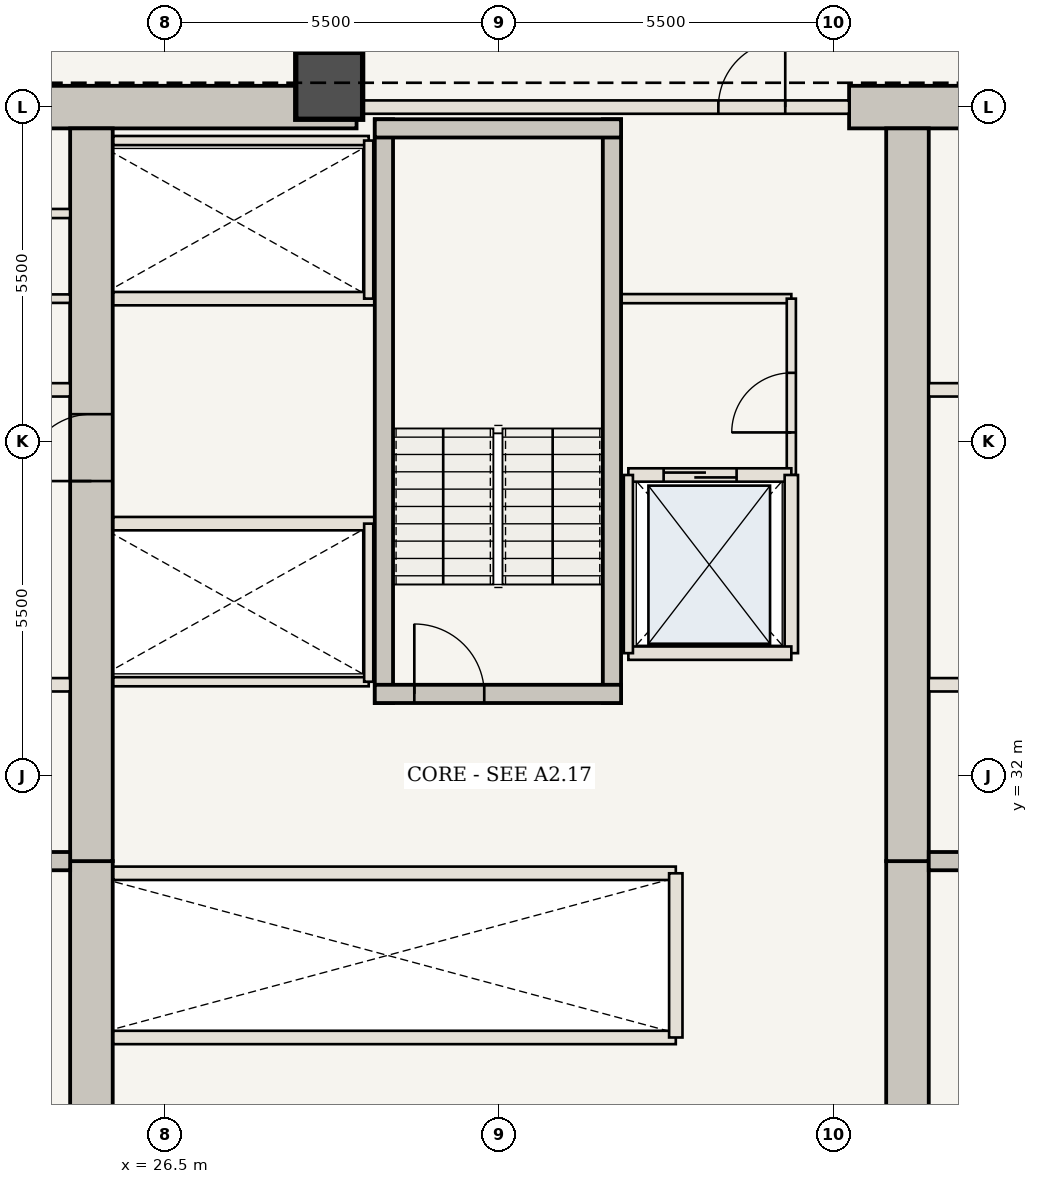
"""IFC4 building model, lengths in metres.
Left out: names, types, materials, properties, quantities, classifications, styles, units other than length and angle.
Written with IfcOpenShell. Run it as: python <this file> out.ifc"""

import sys

from ifc_helpers import new_model, si_unit, direction, frame, frame_2d, origin, origin_2d, place, context, subcontext, project, spatial, rectangle, extrude, element, fill, save


model = new_model("IFC4")
c1 = context("Model", 3, precision=1e-05, world=origin(), true_north=direction((0.0, 1.0)))
c2 = subcontext(c1, "Body", "Model", "MODEL_VIEW")
j1 = project(units=[si_unit("LENGTHUNIT", "METRE"), si_unit("PLANEANGLEUNIT", "RADIAN")], contexts=[c1])
p1 = place(None, origin())
s1 = spatial("IfcSite", under=j1, at=p1, CompositionType="ELEMENT")
p2 = place(p1, origin())
s2 = spatial("IfcBuilding", under=s1, at=p2, CompositionType="ELEMENT")
p3 = place(p2, frame((0.0, 0.0, 66.85)))
s3 = spatial("IfcBuildingStorey", under=s2, at=p3, CompositionType="ELEMENT", Elevation=66.85)
p4 = place(p3, frame((21.41, 43.0, 0.0), z_axis=(0.0, 0.0, 1.0), x_axis=(1.0, 0.0, 0.0)))
e1 = element("IfcWall", 1, at=p4, inside=s3, PredefinedType="SHEAR", context=c2, shape_type="SweptSolid", body=[
    extrude(rectangle(XDim=8.24, YDim=0.7, at=frame_2d((4.12, 0.0))), origin(), (0.0, 0.0, 1.0), 3.5),
])
p5 = place(p3, frame((37.75, 43.0, 0.0), z_axis=(0.0, 0.0, 1.0), x_axis=(1.0, 0.0, 0.0)))
e2 = element("IfcWall", 2, at=p5, inside=s3, PredefinedType="SHEAR", context=c2, shape_type="SweptSolid", body=[
    extrude(rectangle(XDim=4.84, YDim=0.7, at=frame_2d((2.42, 0.0))), origin(), (0.0, 0.0, 1.0), 3.5),
])
p6 = place(p3, frame((25.29, 21.3, 0.0), z_axis=(0.0, 0.0, 1.0), x_axis=(0.0, 1.0, 0.0)))
e3 = element("IfcWall", 3, at=p6, inside=s3, PredefinedType="SHEAR", context=c2, shape_type="SweptSolid", body=[
    extrude(rectangle(XDim=9.3, YDim=0.7, at=frame_2d((4.65, 0.0))), origin(), (0.0, 0.0, 1.0), 3.5),
])
p7 = place(p3, frame((25.29, 30.6, 0.0), z_axis=(0.0, 0.0, 1.0), x_axis=(0.0, 1.0, 0.0)))
e4 = element("IfcWall", 4, at=p7, inside=s3, PredefinedType="SHEAR", context=c2, shape_type="SweptSolid", body=[
    extrude(rectangle(XDim=12.05, YDim=0.7, at=frame_2d((6.025, 0.0))), origin(), (0.0, 0.0, 1.0), 3.5),
])
p8 = place(p7, frame((6.25, 0.0, 0.0)))
e5 = element("IfcOpeningElement", 5, at=p8, cuts=e4, PredefinedType="OPENING", context=c2, shape_type="SweptSolid", body=[
    extrude(rectangle(XDim=1.1, YDim=2.15, at=frame_2d((0.55, 1.075))), frame((0.0, 0.36, 0.0), z_axis=(0.0, -1.0, 0.0), x_axis=(1.0, 0.0, 0.0)), (0.0, 0.0, 1.0), 0.72),
])
p9 = place(p3, frame((38.71, 21.3, 0.0), z_axis=(0.0, 0.0, 1.0), x_axis=(0.0, 1.0, 0.0)))
e6 = element("IfcWall", 6, at=p9, inside=s3, PredefinedType="SHEAR", context=c2, shape_type="SweptSolid", body=[
    extrude(rectangle(XDim=9.3, YDim=0.7, at=frame_2d((4.65, 0.0))), origin(), (0.0, 0.0, 1.0), 3.5),
])
p10 = place(p3, frame((38.71, 30.6, 0.0), z_axis=(0.0, 0.0, 1.0), x_axis=(0.0, 1.0, 0.0)))
e7 = element("IfcWall", 7, at=p10, inside=s3, PredefinedType="SHEAR", context=c2, shape_type="SweptSolid", body=[
    extrude(rectangle(XDim=12.05, YDim=0.7, at=frame_2d((6.025, 0.0))), origin(), (0.0, 0.0, 1.0), 3.5),
])
p11 = place(p3, frame((29.2, 43.35, 0.0), z_axis=(0.0, 0.0, 1.0), x_axis=(1.0, 0.0, 0.0)))
e8 = element("IfcColumn", 8, at=p11, inside=s3, PredefinedType="COLUMN", context=c2, shape_type="SweptSolid", body=[
    extrude(rectangle(XDim=1.1, YDim=1.1, at=origin_2d()), origin(), (0.0, 0.0, 1.0), 3.5),
])
for number, where, z_axis, x_axis in (
    (9, (21.41, 30.6, 0.0), (0.0, 0.0, 1.0), (1.0, 0.0, 0.0)),
    (10, (39.06, 30.6, 0.0), (0.0, 0.0, 1.0), (1.0, 0.0, 0.0)),
):
    element("IfcWall", number, at=place(p3, frame(where, z_axis=z_axis, x_axis=x_axis)), inside=s3, PredefinedType="SHEAR", context=c2, shape_type="SweptSolid", body=[
        extrude(rectangle(XDim=3.53, YDim=0.3, at=frame_2d((1.765, 0.0))), origin(), (0.0, 0.0, 1.0), 3.32),
    ])
p12 = place(p3, frame((21.41, 33.5, 0.0), z_axis=(0.0, 0.0, 1.0), x_axis=(1.0, 0.0, 0.0)))
e11 = element("IfcWall", 11, at=p12, inside=s3, PredefinedType="STANDARD", context=c2, shape_type="SweptSolid", body=[
    extrude(rectangle(XDim=3.53, YDim=0.22, at=frame_2d((1.765, 0.0))), origin(), (0.0, 0.0, 1.0), 3.32),
])
p13 = place(p12, frame((0.75, 0.0, 0.0)))
e12 = element("IfcOpeningElement", 12, at=p13, cuts=e11, PredefinedType="OPENING", context=c2, shape_type="SweptSolid", body=[
    extrude(rectangle(XDim=1.2, YDim=2.2, at=frame_2d((0.6, 1.1))), frame((0.0, 0.12, 0.0), z_axis=(0.0, -1.0, 0.0), x_axis=(1.0, 0.0, 0.0)), (0.0, 0.0, 1.0), 0.24),
])
p14 = place(p3, frame((39.06, 33.5, 0.0), z_axis=(0.0, 0.0, 1.0), x_axis=(1.0, 0.0, 0.0)))
e13 = element("IfcWall", 13, at=p14, inside=s3, PredefinedType="STANDARD", context=c2, shape_type="SweptSolid", body=[
    extrude(rectangle(XDim=3.53, YDim=0.22, at=frame_2d((1.765, 0.0))), origin(), (0.0, 0.0, 1.0), 3.32),
])
p15 = place(p14, frame((1.55, 0.0, 0.0)))
e14 = element("IfcOpeningElement", 14, at=p15, cuts=e13, PredefinedType="OPENING", context=c2, shape_type="SweptSolid", body=[
    extrude(rectangle(XDim=1.2, YDim=2.2, at=frame_2d((0.6, 1.1))), frame((0.0, 0.12, 0.0), z_axis=(0.0, -1.0, 0.0), x_axis=(1.0, 0.0, 0.0)), (0.0, 0.0, 1.0), 0.24),
])
for number, where, z_axis, x_axis in (
    (15, (21.41, 38.35, 0.0), (0.0, 0.0, 1.0), (1.0, 0.0, 0.0)),
    (16, (39.06, 38.35, 0.0), (0.0, 0.0, 1.0), (1.0, 0.0, 0.0)),
):
    element("IfcWall", number, at=place(p3, frame(where, z_axis=z_axis, x_axis=x_axis)), inside=s3, PredefinedType="STANDARD", context=c2, shape_type="SweptSolid", body=[
        extrude(rectangle(XDim=3.53, YDim=0.22, at=frame_2d((1.765, 0.0))), origin(), (0.0, 0.0, 1.0), 3.32),
    ])
p16 = place(p3, frame((21.41, 39.85, 0.0), z_axis=(0.0, 0.0, 1.0), x_axis=(1.0, 0.0, 0.0)))
e17 = element("IfcWall", 17, at=p16, inside=s3, PredefinedType="STANDARD", context=c2, shape_type="SweptSolid", body=[
    extrude(rectangle(XDim=3.53, YDim=0.14, at=frame_2d((1.765, 0.0))), origin(), (0.0, 0.0, 1.0), 3.32),
])
p17 = place(p3, frame((21.41, 41.25, 0.0), z_axis=(0.0, 0.0, 1.0), x_axis=(1.0, 0.0, 0.0)))
e18 = element("IfcWall", 18, at=p17, inside=s3, PredefinedType="STANDARD", context=c2, shape_type="SweptSolid", body=[
    extrude(rectangle(XDim=3.53, YDim=0.15, at=frame_2d((1.765, 0.0))), origin(), (0.0, 0.0, 1.0), 3.32),
])
p18 = place(p3, frame((34.0, 39.85, 0.0), z_axis=(0.0, 0.0, 1.0), x_axis=(1.0, 0.0, 0.0)))
e19 = element("IfcWall", 19, at=p18, inside=s3, PredefinedType="STANDARD", context=c2, shape_type="SweptSolid", body=[
    extrude(rectangle(XDim=2.8, YDim=0.15, at=frame_2d((1.4, 0.0))), origin(), (0.0, 0.0, 1.0), 3.32),
])
p19 = place(p3, frame((36.8, 36.95, 0.0), z_axis=(0.0, 0.0, 1.0), x_axis=(0.0, 1.0, 0.0)))
e20 = element("IfcWall", 20, at=p19, inside=s3, PredefinedType="STANDARD", context=c2, shape_type="SweptSolid", body=[
    extrude(rectangle(XDim=2.9, YDim=0.15, at=frame_2d((1.45, 0.0))), origin(), (0.0, 0.0, 1.0), 3.32),
])
p20 = place(p19, frame((0.7, 0.0, 0.0)))
e21 = element("IfcOpeningElement", 21, at=p20, cuts=e20, PredefinedType="OPENING", context=c2, shape_type="SweptSolid", body=[
    extrude(rectangle(XDim=0.98, YDim=2.2, at=frame_2d((0.49, 1.1))), frame((0.0, 0.085, 0.0), z_axis=(0.0, -1.0, 0.0), x_axis=(1.0, 0.0, 0.0)), (0.0, 0.0, 1.0), 0.17),
])
for number, where, z_axis, x_axis in (
    (22, (25.65, 27.7, 0.0), (0.0, 0.0, 1.0), (1.0, 0.0, 0.0)),
    (23, (25.65, 30.4, 0.0), (0.0, 0.0, 1.0), (1.0, 0.0, 0.0)),
):
    element("IfcWall", number, at=place(p3, frame(where, z_axis=z_axis, x_axis=x_axis)), inside=s3, PredefinedType="STANDARD", context=c2, shape_type="SweptSolid", body=[
        extrude(rectangle(XDim=9.25, YDim=0.22, at=frame_2d((4.625, 0.0))), origin(), (0.0, 0.0, 1.0), 3.32),
    ])
p21 = place(p3, frame((34.9, 27.7, 0.0), z_axis=(0.0, 0.0, 1.0), x_axis=(0.0, 1.0, 0.0)))
e24 = element("IfcWall", 24, at=p21, inside=s3, PredefinedType="STANDARD", context=c2, shape_type="SweptSolid", body=[
    extrude(rectangle(XDim=2.7, YDim=0.22, at=frame_2d((1.35, 0.0))), origin(), (0.0, 0.0, 1.0), 3.32),
])
p22 = place(p3, frame((25.65, 36.15, 0.0), z_axis=(0.0, 0.0, 1.0), x_axis=(1.0, 0.0, 0.0)))
e25 = element("IfcWall", 25, at=p22, inside=s3, PredefinedType="STANDARD", context=c2, shape_type="SweptSolid", body=[
    extrude(rectangle(XDim=4.3, YDim=0.22, at=frame_2d((2.15, 0.0))), origin(), (0.0, 0.0, 1.0), 3.32),
])
p23 = place(p3, frame((25.65, 33.55, 0.0), z_axis=(0.0, 0.0, 1.0), x_axis=(1.0, 0.0, 0.0)))
e26 = element("IfcWall", 26, at=p23, inside=s3, PredefinedType="STANDARD", context=c2, shape_type="SweptSolid", body=[
    extrude(rectangle(XDim=4.2, YDim=0.15, at=frame_2d((2.1, 0.0))), origin(), (0.0, 0.0, 1.0), 3.32),
])
p24 = place(p3, frame((29.85, 33.55, 0.0), z_axis=(0.0, 0.0, 1.0), x_axis=(0.0, 1.0, 0.0)))
e27 = element("IfcWall", 27, at=p24, inside=s3, PredefinedType="STANDARD", context=c2, shape_type="SweptSolid", body=[
    extrude(rectangle(XDim=2.6, YDim=0.15, at=frame_2d((1.3, 0.0))), origin(), (0.0, 0.0, 1.0), 3.32),
])
p25 = place(p3, frame((25.65, 39.85, 0.0), z_axis=(0.0, 0.0, 1.0), x_axis=(1.0, 0.0, 0.0)))
e28 = element("IfcWall", 28, at=p25, inside=s3, PredefinedType="STANDARD", context=c2, shape_type="SweptSolid", body=[
    extrude(rectangle(XDim=4.3, YDim=0.22, at=frame_2d((2.15, 0.0))), origin(), (0.0, 0.0, 1.0), 3.32),
])
p26 = place(p3, frame((25.65, 42.45, 0.0), z_axis=(0.0, 0.0, 1.0), x_axis=(1.0, 0.0, 0.0)))
e29 = element("IfcWall", 29, at=p26, inside=s3, PredefinedType="STANDARD", context=c2, shape_type="SweptSolid", body=[
    extrude(rectangle(XDim=4.2, YDim=0.15, at=frame_2d((2.1, 0.0))), origin(), (0.0, 0.0, 1.0), 3.32),
])
p27 = place(p3, frame((29.85, 39.85, 0.0), z_axis=(0.0, 0.0, 1.0), x_axis=(0.0, 1.0, 0.0)))
e30 = element("IfcWall", 30, at=p27, inside=s3, PredefinedType="STANDARD", context=c2, shape_type="SweptSolid", body=[
    extrude(rectangle(XDim=2.6, YDim=0.15, at=frame_2d((1.3, 0.0))), origin(), (0.0, 0.0, 1.0), 3.32),
])
for number, where, z_axis, x_axis in (
    (31, (30.1, 33.2, 0.0), (0.0, 0.0, 1.0), (0.0, 1.0, 0.0)),
    (32, (33.85, 33.2, 0.0), (0.0, 0.0, 1.0), (0.0, 1.0, 0.0)),
):
    element("IfcWall", number, at=place(p3, frame(where, z_axis=z_axis, x_axis=x_axis)), inside=s3, PredefinedType="SHEAR", context=c2, shape_type="SweptSolid", body=[
        extrude(rectangle(XDim=9.6, YDim=0.3, at=frame_2d((4.8, 0.0))), origin(), (0.0, 0.0, 1.0), 3.32),
    ])
p28 = place(p3, frame((29.95, 33.35, 0.0), z_axis=(0.0, 0.0, 1.0), x_axis=(1.0, 0.0, 0.0)))
e33 = element("IfcWall", 33, at=p28, inside=s3, PredefinedType="SHEAR", context=c2, shape_type="SweptSolid", body=[
    extrude(rectangle(XDim=4.05, YDim=0.3, at=frame_2d((2.025, 0.0))), origin(), (0.0, 0.0, 1.0), 3.32),
])
p29 = place(p28, frame((0.65, 0.0, 0.0)))
e34 = element("IfcOpeningElement", 34, at=p29, cuts=e33, PredefinedType="OPENING", context=c2, shape_type="SweptSolid", body=[
    extrude(rectangle(XDim=1.15, YDim=2.15, at=frame_2d((0.575, 1.075))), frame((0.0, 0.16, 0.0), z_axis=(0.0, -1.0, 0.0), x_axis=(1.0, 0.0, 0.0)), (0.0, 0.0, 1.0), 0.32),
])
p30 = place(p3, frame((29.95, 42.65, 0.0), z_axis=(0.0, 0.0, 1.0), x_axis=(1.0, 0.0, 0.0)))
e35 = element("IfcWall", 35, at=p30, inside=s3, PredefinedType="SHEAR", context=c2, shape_type="SweptSolid", body=[
    extrude(rectangle(XDim=4.05, YDim=0.3, at=frame_2d((2.025, 0.0))), origin(), (0.0, 0.0, 1.0), 3.32),
])
p31 = place(p3, frame((29.65, 43.0, 0.0), z_axis=(0.0, 0.0, 1.0), x_axis=(1.0, 0.0, 0.0)))
e36 = element("IfcWall", 36, at=p31, inside=s3, PredefinedType="STANDARD", context=c2, shape_type="SweptSolid", body=[
    extrude(rectangle(XDim=8.1, YDim=0.22, at=frame_2d((4.05, 0.0))), origin(), (0.0, 0.0, 1.0), 3.32),
])
p32 = place(p31, frame((5.95, 0.0, 0.0)))
e37 = element("IfcOpeningElement", 37, at=p32, cuts=e36, PredefinedType="OPENING", context=c2, shape_type="SweptSolid", body=[
    extrude(rectangle(XDim=1.1, YDim=2.15, at=frame_2d((0.55, 1.075))), frame((0.0, 0.12, 0.0), z_axis=(0.0, -1.0, 0.0), x_axis=(1.0, 0.0, 0.0)), (0.0, 0.0, 1.0), 0.24),
])
p33 = place(p3, frame((34.12, 36.95, 0.0), z_axis=(0.0, 0.0, 1.0), x_axis=(1.0, 0.0, 0.0)))
e38 = element("IfcWall", 38, at=p33, inside=s3, PredefinedType="STANDARD", context=c2, shape_type="SweptSolid", body=[
    extrude(rectangle(XDim=2.68, YDim=0.22, at=frame_2d((1.34, 0.0))), origin(), (0.0, 0.0, 1.0), 3.32),
])
p34 = place(p33, frame((0.58, 0.0, 0.0)))
e39 = element("IfcOpeningElement", 39, at=p34, cuts=e38, PredefinedType="OPENING", context=c2, shape_type="SweptSolid", body=[
    extrude(rectangle(XDim=1.2, YDim=2.2, at=frame_2d((0.6, 1.1))), frame((0.0, 0.12, 0.0), z_axis=(0.0, -1.0, 0.0), x_axis=(1.0, 0.0, 0.0)), (0.0, 0.0, 1.0), 0.24),
])
p35 = place(p3, frame((36.8, 34.02, 0.0), z_axis=(0.0, 0.0, 1.0), x_axis=(0.0, 1.0, 0.0)))
e40 = element("IfcWall", 40, at=p35, inside=s3, PredefinedType="STANDARD", context=c2, shape_type="SweptSolid", body=[
    extrude(rectangle(XDim=2.93, YDim=0.22, at=frame_2d((1.465, 0.0))), origin(), (0.0, 0.0, 1.0), 3.32),
])
p36 = place(p3, frame((34.12, 34.02, 0.0), z_axis=(0.0, 0.0, 1.0), x_axis=(1.0, 0.0, 0.0)))
e41 = element("IfcWall", 41, at=p36, inside=s3, PredefinedType="STANDARD", context=c2, shape_type="SweptSolid", body=[
    extrude(rectangle(XDim=2.68, YDim=0.22, at=frame_2d((1.34, 0.0))), origin(), (0.0, 0.0, 1.0), 3.32),
])
p37 = place(p3, frame((34.12, 34.02, 0.0), z_axis=(0.0, 0.0, 1.0), x_axis=(0.0, 1.0, 0.0)))
e42 = element("IfcWall", 42, at=p37, inside=s3, PredefinedType="STANDARD", context=c2, shape_type="SweptSolid", body=[
    extrude(rectangle(XDim=2.93, YDim=0.15, at=frame_2d((1.465, 0.0))), origin(), (0.0, 0.0, 1.0), 3.32),
])
p38 = place(p8, origin())
e43 = element("IfcDoor", 43, at=p38, inside=s3, OperationType="SINGLE_SWING_LEFT", PredefinedType="DOOR", context=c2, shape_type="SweptSolid", body=[
    extrude(rectangle(XDim=1.1, YDim=2.15, at=frame_2d((0.55, 1.075))), frame((0.0, 0.025, 0.0), z_axis=(0.0, -1.0, 0.0), x_axis=(1.0, 0.0, 0.0)), (0.0, 0.0, 1.0), 0.05),
])
fill(e5, e43)
p39 = place(p20, origin())
e44 = element("IfcDoor", 44, at=p39, inside=s3, OperationType="SINGLE_SWING_LEFT", PredefinedType="DOOR", context=c2, shape_type="SweptSolid", body=[
    extrude(rectangle(XDim=0.98, YDim=2.2, at=frame_2d((0.49, 1.1))), frame((0.0, 0.025, 0.0), z_axis=(0.0, -1.0, 0.0), x_axis=(1.0, 0.0, 0.0)), (0.0, 0.0, 1.0), 0.05),
])
fill(e21, e44)
p40 = place(p29, origin())
e45 = element("IfcDoor", 45, at=p40, inside=s3, OperationType="SINGLE_SWING_LEFT", PredefinedType="DOOR", context=c2, shape_type="SweptSolid", body=[
    extrude(rectangle(XDim=1.15, YDim=2.15, at=frame_2d((0.575, 1.075))), frame((0.0, 0.025, 0.0), z_axis=(0.0, -1.0, 0.0), x_axis=(1.0, 0.0, 0.0)), (0.0, 0.0, 1.0), 0.05),
])
fill(e34, e45)
p41 = place(p32, origin())
e46 = element("IfcDoor", 46, at=p41, inside=s3, OperationType="SINGLE_SWING_RIGHT", PredefinedType="DOOR", context=c2, shape_type="SweptSolid", body=[
    extrude(rectangle(XDim=1.1, YDim=2.15, at=frame_2d((0.55, 1.075))), frame((0.0, 0.025, 0.0), z_axis=(0.0, -1.0, 0.0), x_axis=(1.0, 0.0, 0.0)), (0.0, 0.0, 1.0), 0.05),
])
fill(e37, e46)
p42 = place(p34, origin())
e47 = element("IfcDoor", 47, at=p42, inside=s3, OperationType="DOUBLE_DOOR_SLIDING", PredefinedType="DOOR", context=c2, shape_type="SweptSolid", body=[
    extrude(rectangle(XDim=1.2, YDim=2.2, at=frame_2d((0.6, 1.1))), frame((0.0, 0.025, 0.0), z_axis=(0.0, -1.0, 0.0), x_axis=(1.0, 0.0, 0.0)), (0.0, 0.0, 1.0), 0.05),
])
fill(e39, e47)
save(model, sys.argv[1])
